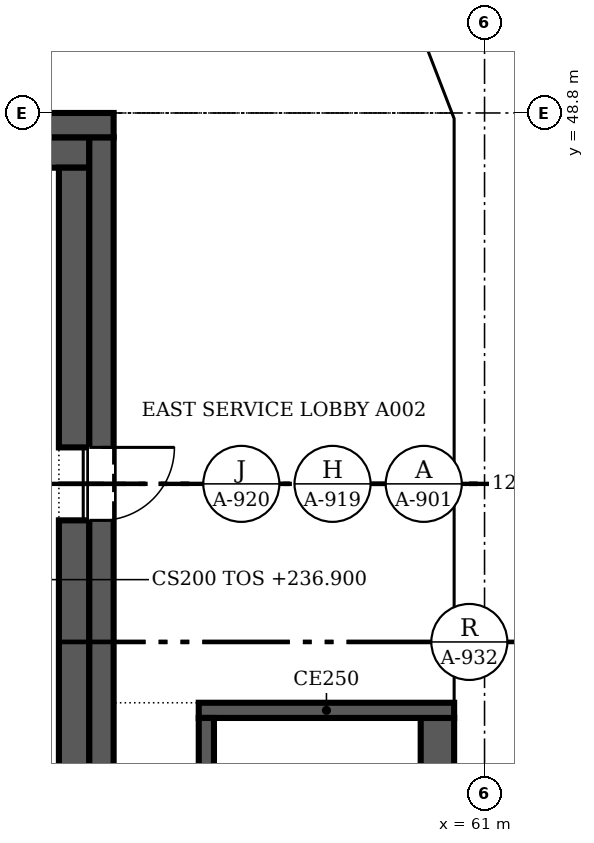
"""IFC4 building model, lengths in metres.
Left out: names, types, materials, properties, quantities, classifications, styles, units other than length and angle.
Written with IfcOpenShell. Run it as: python <this file> out.ifc"""

import sys

from ifc_helpers import new_model, si_unit, direction, frame, frame_2d, origin, place, context, subcontext, project, spatial, polyline, rectangle, outline, extrude, faceted_brep, source, transform, mapped, element, fill, save


model = new_model("IFC4")
c1 = context("Model", 3, precision=1e-05, world=origin(), true_north=direction((0.0, 1.0)))
c2 = subcontext(c1, "Body", "Model", "MODEL_VIEW")
j1 = project(units=[si_unit("LENGTHUNIT", "METRE"), si_unit("PLANEANGLEUNIT", "RADIAN")], contexts=[c1])
p1 = place(None, origin())
s1 = spatial("IfcSite", under=j1, at=p1, CompositionType="ELEMENT")
p2 = place(p1, origin())
s2 = spatial("IfcBuilding", under=s1, at=p2, CompositionType="ELEMENT")
p3 = place(p2, frame((0.0, 0.0, 236.9)))
s3 = spatial("IfcBuildingStorey", under=s2, at=p3, CompositionType="ELEMENT", Elevation=236.9)
m1 = source(origin(), c2, "Body", "Brep", [
    faceted_brep([(6.1, -0.25, 0.0), (3.05, -0.25, 3.8), (0.0, -0.25, 0.0), (6.1, -0.25, 0.0), (0.0, 0.25, 0.0), (3.05, 0.25, 3.8), (6.1, 0.25, 0.0), (6.1, 0.25, 0.0)], [[[0, 1, 2, 3]], [[4, 5, 6, 7]], [[6, 5, 1, 0]], [[5, 4, 2, 1]], [[4, 7, 3, 2]], [[3, 7, 6, 0]]]),
])
p4 = place(p3, frame((60.75, 36.6, 0.0), z_axis=(0.0, 0.0, 1.0), x_axis=(0.0, 1.0, 0.0)))
e1 = element("IfcWall", 1, at=p4, inside=s3, PredefinedType="SOLIDWALL", context=c2, shape_type="MappedRepresentation", body=[
    mapped(m1, transform((0.0, 0.0, 0.0), scale=1.0)),
])
m2 = source(origin(), c2, "Body", "SweptSolid", [
    extrude(outline(polyline([(5.579, 0.25), (3.05, 3.401), (0.521, 0.25), (5.579, 0.25)])), frame((0.0, 0.26, 0.0), z_axis=(0.0, -1.0, 0.0), x_axis=(1.0, 0.0, 0.0)), (0.0, 0.0, 1.0), 0.52),
])
p5 = place(p4, origin())
e2 = element("IfcOpeningElement", 2, at=p5, cuts=e1, PredefinedType="OPENING", context=c2, shape_type="MappedRepresentation", body=[
    mapped(m2, transform((0.0, 0.0, 0.0), scale=1.0)),
])
m3 = source(origin(), c2, "Body", "Brep", [
    faceted_brep([(6.053, -0.25, 0.0), (3.05, -0.25, 3.8), (0.0, -0.25, 0.0), (0.0, 0.25, 0.0), (3.05, 0.25, 3.8), (6.007, 0.25, 0.059), (6.007, 0.25, 0.0), (6.053, 0.0, 0.0)], [[[0, 1, 2]], [[3, 4, 5, 6]], [[5, 4, 1, 0, 7]], [[4, 3, 2, 1]], [[3, 6, 7, 0, 2]], [[7, 6, 5]]]),
])
p6 = place(p3, frame((60.75, 42.7, 0.0), z_axis=(0.0, 0.0, 1.0), x_axis=(0.0, 1.0, 0.0)))
e3 = element("IfcWall", 3, at=p6, inside=s3, PredefinedType="SOLIDWALL", context=c2, shape_type="MappedRepresentation", body=[
    mapped(m3, transform((0.0, 0.0, 0.0), scale=1.0)),
])
m4 = source(origin(), c2, "Body", "SweptSolid", [
    extrude(outline(polyline([(5.537, 0.25), (3.049, 3.399), (0.521, 0.25), (5.537, 0.25)])), frame((0.0, 0.26, 0.0), z_axis=(0.0, -1.0, 0.0), x_axis=(1.0, 0.0, 0.0)), (0.0, 0.0, 1.0), 0.52),
])
p7 = place(p6, origin())
e4 = element("IfcOpeningElement", 4, at=p7, cuts=e3, PredefinedType="OPENING", context=c2, shape_type="MappedRepresentation", body=[
    mapped(m4, transform((0.0, 0.0, 0.0), scale=1.0)),
])
m5 = source(origin(), c2, "Body", "Brep", [
    faceted_brep([(3.003, -0.25, 3.732), (2.95, -0.25, 3.8), (0.0, -0.25, 0.0), (3.003, -0.25, 0.0), (0.047, 0.25, 0.06), (2.898, 0.25, 3.732), (2.898, 0.25, 0.0), (0.047, 0.25, 0.0), (2.95, 0.0, 3.8), (0.0, 0.0, 0.0)], [[[0, 1, 2, 3]], [[4, 5, 6, 7]], [[8, 1, 0]], [[5, 4, 9, 2, 1, 8]], [[7, 6, 3, 2, 9]], [[7, 9, 4]], [[3, 6, 5, 8, 0]]]),
])
p8 = place(p3, frame((60.75, 48.753, 0.0), z_axis=(0.0, 0.0, 1.0), x_axis=(-0.35992665181, 0.932980602862, 0.0)))
e5 = element("IfcWall", 5, at=p8, inside=s3, PredefinedType="SOLIDWALL", context=c2, shape_type="MappedRepresentation", body=[
    mapped(m5, transform((0.0, 0.0, 0.0), scale=1.0)),
])
m6 = source(origin(), c2, "Body", "SweptSolid", [
    extrude(outline(polyline([(2.75, 3.135), (0.511, 0.25), (2.75, 0.25), (2.75, 3.135)])), frame((0.0, 0.26, 0.0), z_axis=(0.0, -1.0, 0.0), x_axis=(1.0, 0.0, 0.0)), (0.0, 0.0, 1.0), 0.52),
])
p9 = place(p8, origin())
e6 = element("IfcOpeningElement", 6, at=p9, cuts=e5, PredefinedType="OPENING", context=c2, shape_type="MappedRepresentation", body=[
    mapped(m6, transform((0.0, 0.0, 0.0), scale=1.0)),
])
p10 = place(p2, frame((0.0, 0.0, 240.7)))
s4 = spatial("IfcBuildingStorey", under=s2, at=p10, CompositionType="ELEMENT", Elevation=240.7)
m7 = source(origin(), c2, "Body", "Brep", [
    faceted_brep([(3.05, -0.25, 0.0), (6.1, -0.25, 3.8), (6.1, -0.25, 3.8), (3.05, -0.25, 7.6), (0.0, -0.25, 3.8), (0.0, 0.25, 3.8), (3.05, 0.25, 7.6), (6.1, 0.25, 3.8), (6.1, 0.25, 3.8), (3.05, 0.25, 0.0)], [[[0, 1, 2, 3, 4]], [[5, 6, 7, 8, 9]], [[9, 8, 1, 0]], [[7, 6, 3, 2]], [[6, 5, 4, 3]], [[5, 9, 0, 4]], [[1, 8, 7, 2]]]),
])
p11 = place(p10, frame((60.75, 33.55, -3.8), z_axis=(0.0, 0.0, 1.0), x_axis=(0.0, 1.0, 0.0)))
e7 = element("IfcWall", 7, at=p11, inside=s4, PredefinedType="SOLIDWALL", context=c2, shape_type="MappedRepresentation", body=[
    mapped(m7, transform((0.0, 0.0, 0.0), scale=1.0)),
])
m8 = source(origin(), c2, "Body", "SweptSolid", [
    extrude(outline(polyline([(3.05, 0.399), (5.78, 3.8), (3.05, 7.201), (0.321, 3.8), (3.05, 0.399)])), frame((0.0, 0.26, 0.0), z_axis=(0.0, -1.0, 0.0), x_axis=(1.0, 0.0, 0.0)), (0.0, 0.0, 1.0), 0.52),
])
p12 = place(p11, origin())
e8 = element("IfcOpeningElement", 8, at=p12, cuts=e7, PredefinedType="OPENING", context=c2, shape_type="MappedRepresentation", body=[
    mapped(m8, transform((0.0, 0.0, 0.0), scale=1.0)),
])
m9 = source(origin(), c2, "Body", "SweptSolid", [
    extrude(outline(polyline([(3.05, 0.0), (6.1, 3.8), (3.05, 7.6), (0.0, 3.8), (3.05, 0.0)])), frame((0.0, 0.25, 0.0), z_axis=(0.0, -1.0, 0.0), x_axis=(1.0, 0.0, 0.0)), (0.0, 0.0, 1.0), 0.5),
])
p13 = place(p10, frame((60.75, 39.65, -3.8), z_axis=(0.0, 0.0, 1.0), x_axis=(0.0, 1.0, 0.0)))
e9 = element("IfcWall", 9, at=p13, inside=s4, PredefinedType="SOLIDWALL", context=c2, shape_type="MappedRepresentation", body=[
    mapped(m9, transform((0.0, 0.0, 0.0), scale=1.0)),
])
p14 = place(p13, origin())
e10 = element("IfcOpeningElement", 10, at=p14, cuts=e9, PredefinedType="OPENING", context=c2, shape_type="MappedRepresentation", body=[
    mapped(m8, transform((0.0, 0.0, 0.0), scale=1.0)),
])
m10 = source(origin(), c2, "Body", "Brep", [
    faceted_brep([(3.003, -0.25, 0.0), (3.05, -0.25, 0.06), (3.05, -0.25, 7.54), (3.003, -0.25, 7.6), (0.0, -0.25, 3.8), (0.0, 0.25, 3.8), (2.957, 0.25, 7.541), (2.957, 0.25, 0.059), (3.003, 0.0, 0.0), (3.003, 0.0, 7.6)], [[[0, 1, 2, 3, 4]], [[5, 6, 7]], [[1, 0, 8]], [[9, 3, 2]], [[6, 5, 4, 3, 9]], [[5, 7, 8, 0, 4]], [[1, 8, 7, 6, 9, 2]]]),
])
p15 = place(p10, frame((60.75, 45.75, -3.8), z_axis=(0.0, 0.0, 1.0), x_axis=(0.0, 1.0, 0.0)))
e11 = element("IfcWall", 11, at=p15, inside=s4, PredefinedType="SOLIDWALL", context=c2, shape_type="MappedRepresentation", body=[
    mapped(m10, transform((0.0, 0.0, 0.0), scale=1.0)),
])
m11 = source(origin(), c2, "Body", "SweptSolid", [
    extrude(outline(polyline([(2.803, 6.944), (0.319, 3.8), (2.803, 0.656), (2.803, 6.944)])), frame((0.0, 0.26, 0.0), z_axis=(0.0, -1.0, 0.0), x_axis=(1.0, 0.0, 0.0)), (0.0, 0.0, 1.0), 0.52),
])
p16 = place(p15, origin())
e12 = element("IfcOpeningElement", 12, at=p16, cuts=e11, PredefinedType="OPENING", context=c2, shape_type="MappedRepresentation", body=[
    mapped(m11, transform((0.0, 0.0, 0.0), scale=1.0)),
])
m12 = source(origin(), c2, "Body", "Brep", [
    faceted_brep([(0.047, -0.25, 0.0), (2.997, -0.25, 3.8), (0.047, -0.25, 7.6), (0.0, -0.25, 7.541), (0.0, -0.25, 0.059), (0.093, 0.25, 7.54), (2.944, 0.25, 3.868), (2.944, 0.25, 3.732), (0.093, 0.25, 0.06), (2.997, 0.0, 3.8), (0.047, 0.0, 0.0), (0.047, 0.0, 7.6)], [[[0, 1, 2, 3, 4]], [[5, 6, 7, 8]], [[8, 7, 9, 1, 0, 10]], [[6, 5, 11, 2, 1, 9]], [[3, 2, 11]], [[10, 0, 4]], [[8, 10, 4, 3, 11, 5]], [[9, 7, 6]]]),
])
p17 = place(p10, frame((60.767, 48.71, -3.8), z_axis=(0.0, 0.0, 1.0), x_axis=(-0.359901446078, 0.932990326376, 0.0)))
e13 = element("IfcWall", 13, at=p17, inside=s4, PredefinedType="SOLIDWALL", context=c2, shape_type="MappedRepresentation", body=[
    mapped(m12, transform((0.0, 0.0, 0.0), scale=1.0)),
])
m13 = source(origin(), c2, "Body", "SweptSolid", [
    extrude(outline(polyline([(0.247, 0.665), (2.681, 3.8), (0.247, 6.935), (0.247, 0.665)])), frame((0.0, 0.26, 0.0), z_axis=(0.0, -1.0, 0.0), x_axis=(1.0, 0.0, 0.0)), (0.0, 0.0, 1.0), 0.52),
])
p18 = place(p17, origin())
e14 = element("IfcOpeningElement", 14, at=p18, cuts=e13, PredefinedType="OPENING", context=c2, shape_type="MappedRepresentation", body=[
    mapped(m13, transform((0.0, 0.0, 0.0), scale=1.0)),
])
p19 = place(p3, frame((30.5, 48.6, 0.0), z_axis=(0.0, 0.0, 1.0), x_axis=(1.0, 0.0, 0.0)))
e15 = element("IfcWall", 15, at=p19, inside=s3, PredefinedType="SHEAR", context=c2, shape_type="SweptSolid", body=[
    extrude(rectangle(XDim=24.4, YDim=0.4, at=frame_2d((12.2, 0.0))), origin(), (0.0, 0.0, 1.0), 3.8),
])
p20 = place(p3, frame((54.7, 48.4, 0.0), z_axis=(0.0, 0.0, 1.0), x_axis=(0.0, -1.0, 0.0)))
e16 = element("IfcWall", 16, at=p20, inside=s3, PredefinedType="SHEAR", context=c2, shape_type="SweptSolid", body=[
    extrude(rectangle(XDim=23.6, YDim=0.4, at=frame_2d((11.8, 0.0))), origin(), (0.0, 0.0, 1.0), 3.8),
])
m14 = source(origin(), c2, "Body", "SweptSolid", [
    extrude(rectangle(XDim=1.2, YDim=2.1, at=frame_2d((0.6, 1.05))), frame((0.0, 0.21, 0.0), z_axis=(0.0, -1.0, 0.0), x_axis=(1.0, 0.0, 0.0)), (0.0, 0.0, 1.0), 0.42),
])
p21 = place(p20, frame((5.1, 0.0, 0.0)))
e17 = element("IfcOpeningElement", 17, at=p21, cuts=e16, PredefinedType="OPENING", context=c2, shape_type="MappedRepresentation", body=[
    mapped(m14, transform((0.0, 0.0, 0.0), scale=1.0)),
])
p22 = place(p3, frame((30.9, 48.15, 0.0), z_axis=(0.0, 0.0, 1.0), x_axis=(1.0, 0.0, 0.0)))
e18 = element("IfcWall", 18, at=p22, inside=s3, PredefinedType="SOLIDWALL", context=c2, shape_type="SweptSolid", body=[
    extrude(rectangle(XDim=23.6, YDim=0.5, at=frame_2d((11.8, 0.0))), origin(), (0.0, 0.0, 1.0), 3.8),
])
p23 = place(p3, frame((54.25, 36.88, 0.0), z_axis=(0.0, 0.0, 1.0), x_axis=(0.0, 1.0, 0.0)))
e19 = element("IfcWall", 19, at=p23, inside=s3, PredefinedType="SOLIDWALL", context=c2, shape_type="SweptSolid", body=[
    extrude(rectangle(XDim=5.22, YDim=0.5, at=frame_2d((2.61, 0.0))), origin(), (0.0, 0.0, 1.0), 3.8),
])
p24 = place(p3, frame((54.25, 43.3, 0.0), z_axis=(0.0, 0.0, 1.0), x_axis=(0.0, 1.0, 0.0)))
e20 = element("IfcWall", 20, at=p24, inside=s3, PredefinedType="SOLIDWALL", context=c2, shape_type="SweptSolid", body=[
    extrude(rectangle(XDim=4.6, YDim=0.5, at=frame_2d((2.3, 0.0))), origin(), (0.0, 0.0, 1.0), 3.8),
])
p25 = place(p3, frame((56.425, 30.85, 0.0), z_axis=(0.0, 0.0, 1.0), x_axis=(0.0, 1.0, 0.0)))
e21 = element("IfcWall", 21, at=p25, inside=s3, PredefinedType="SOLIDWALL", context=c2, shape_type="SweptSolid", body=[
    extrude(rectangle(XDim=8.0, YDim=0.25, at=frame_2d((4.0, 0.0))), origin(), (0.0, 0.0, 1.0), 3.8),
])
p26 = place(p3, frame((56.3, 38.975, 0.0), z_axis=(0.0, 0.0, 1.0), x_axis=(1.0, 0.0, 0.0)))
e22 = element("IfcWall", 22, at=p26, inside=s3, PredefinedType="SOLIDWALL", context=c2, shape_type="SweptSolid", body=[
    extrude(rectangle(XDim=4.2, YDim=0.25, at=frame_2d((2.1, 0.0))), origin(), (0.0, 0.0, 1.0), 3.8),
])
p27 = place(p3, frame((60.225, 38.85, 0.0), z_axis=(0.0, 0.0, 1.0), x_axis=(0.0, -1.0, 0.0)))
e23 = element("IfcWall", 23, at=p27, inside=s3, PredefinedType="SOLIDWALL", context=c2, shape_type="SweptSolid", body=[
    extrude(rectangle(XDim=8.0, YDim=0.55, at=frame_2d((4.0, 0.0))), origin(), (0.0, 0.0, 1.0), 3.8),
])
m15 = source(origin(), c2, "Body", "SweptSolid", [
    extrude(rectangle(XDim=1.2, YDim=2.1, at=frame_2d((0.6, 1.05))), frame((0.0, 0.025, 0.0), z_axis=(0.0, -1.0, 0.0), x_axis=(1.0, 0.0, 0.0)), (0.0, 0.0, 1.0), 0.05),
])
p28 = place(p21, origin())
e24 = element("IfcDoor", 24, at=p28, inside=s3, OperationType="SINGLE_SWING_LEFT", PredefinedType="DOOR", context=c2, shape_type="MappedRepresentation", body=[
    mapped(m15, transform((0.0, 0.0, 0.0), scale=1.0)),
])
fill(e17, e24)
save(model, sys.argv[1])
